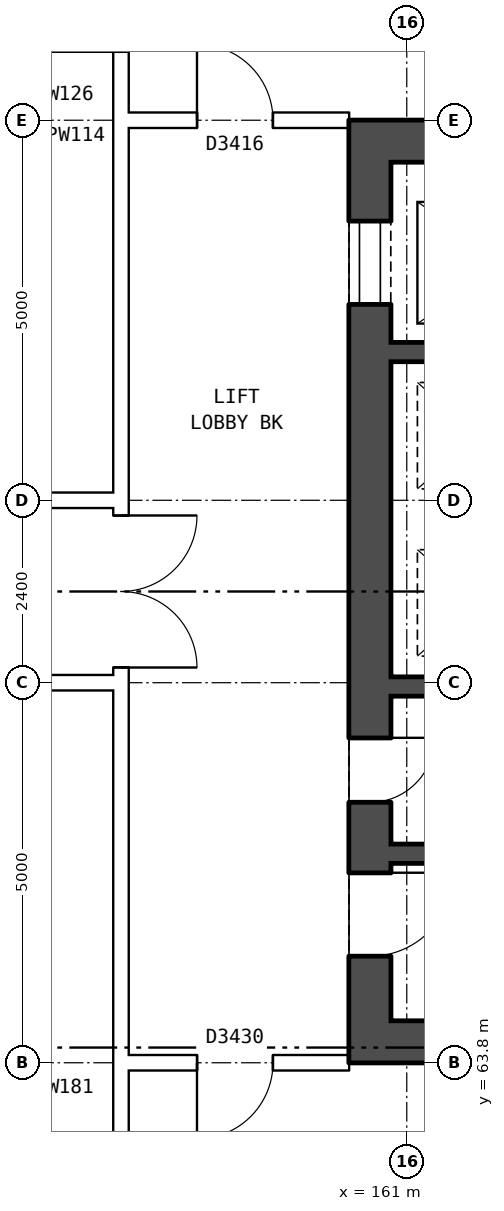
"""IFC4 building model, lengths in metres.
Left out: names, types, materials, properties, quantities, classifications, styles, units other than length and angle.
Written with IfcOpenShell. Run it as: python <this file> out.ifc"""

import sys

from ifc_helpers import new_model, si_unit, direction, frame, frame_2d, origin, place, context, subcontext, project, spatial, rectangle, extrude, element, fill, save


model = new_model("IFC4")
c1 = context("Model", 3, precision=1e-05, world=origin(), true_north=direction((0.0, 1.0)))
c2 = subcontext(c1, "Body", "Model", "MODEL_VIEW")
j1 = project(units=[si_unit("LENGTHUNIT", "METRE"), si_unit("PLANEANGLEUNIT", "RADIAN")], contexts=[c1])
p1 = place(None, origin())
s1 = spatial("IfcSite", under=j1, at=p1, CompositionType="ELEMENT")
p2 = place(p1, origin())
s2 = spatial("IfcBuilding", under=s1, at=p2, CompositionType="ELEMENT")
p3 = place(p2, frame((0.0, 0.0, 115.0)))
s3 = spatial("IfcBuildingStorey", under=s2, at=p3, CompositionType="ELEMENT", Elevation=115.0)
p4 = place(p3, frame((160.515, 76.2, 0.0), z_axis=(0.0, 0.0, 1.0), x_axis=(0.0, -1.0, 0.0)))
e1 = element("IfcWall", 1, at=p4, inside=s3, PredefinedType="SHEAR", context=c2, shape_type="SweptSolid", body=[
    extrude(rectangle(XDim=12.4, YDim=0.55, at=frame_2d((6.2, 0.0))), origin(), (0.0, 0.0, 1.0), 4.2),
])
p5 = place(p4, frame((1.325, 0.0, 0.0)))
e2 = element("IfcOpeningElement", 2, at=p5, cuts=e1, PredefinedType="OPENING", context=c2, shape_type="SweptSolid", body=[
    extrude(rectangle(XDim=1.1, YDim=2.1, at=frame_2d((0.55, 1.05))), frame((0.0, 0.285, 0.0), z_axis=(0.0, -1.0, 0.0), x_axis=(1.0, 0.0, 0.0)), (0.0, 0.0, 1.0), 0.57),
])
p6 = place(p4, frame((9.9, 0.0, 0.0)))
e3 = element("IfcOpeningElement", 3, at=p6, cuts=e1, PredefinedType="OPENING", context=c2, shape_type="SweptSolid", body=[
    extrude(rectangle(XDim=1.1, YDim=2.1, at=frame_2d((0.55, 1.05))), frame((0.0, 0.285, 0.0), z_axis=(0.0, -1.0, 0.0), x_axis=(1.0, 0.0, 0.0)), (0.0, 0.0, 1.0), 0.57),
])
p7 = place(p4, frame((8.125, 0.0, 0.0)))
e4 = element("IfcOpeningElement", 4, at=p7, cuts=e1, PredefinedType="OPENING", context=c2, shape_type="SweptSolid", body=[
    extrude(rectangle(XDim=0.85, YDim=2.1, at=frame_2d((0.425, 1.05))), frame((0.0, 0.285, 0.0), z_axis=(0.0, -1.0, 0.0), x_axis=(1.0, 0.0, 0.0)), (0.0, 0.0, 1.0), 0.57),
])
for number, where, z_axis, x_axis in (
    (5, (160.79, 75.925, 0.0), (0.0, 0.0, 1.0), (1.0, 0.0, 0.0)),
    (6, (160.79, 64.075, 0.0), (0.0, 0.0, 1.0), (1.0, 0.0, 0.0)),
):
    element("IfcWall", number, at=place(p3, frame(where, z_axis=z_axis, x_axis=x_axis)), inside=s3, PredefinedType="SHEAR", context=c2, shape_type="SweptSolid", body=[
        extrude(rectangle(XDim=7.3, YDim=0.55, at=frame_2d((3.65, 0.0))), origin(), (0.0, 0.0, 1.0), 4.2),
    ])
p8 = place(p3, frame((160.79, 73.15, 0.0), z_axis=(0.0, 0.0, 1.0), x_axis=(1.0, 0.0, 0.0)))
e7 = element("IfcWall", 7, at=p8, inside=s3, PredefinedType="SHEAR", context=c2, shape_type="SweptSolid", body=[
    extrude(rectangle(XDim=4.475, YDim=0.25, at=frame_2d((2.237, 0.0))), origin(), (0.0, 0.0, 1.0), 4.2),
])
p9 = place(p3, frame((160.79, 68.75, 0.0), z_axis=(0.0, 0.0, 1.0), x_axis=(1.0, 0.0, 0.0)))
e8 = element("IfcWall", 8, at=p9, inside=s3, PredefinedType="SHEAR", context=c2, shape_type="SweptSolid", body=[
    extrude(rectangle(XDim=7.3, YDim=0.25, at=frame_2d((3.65, 0.0))), origin(), (0.0, 0.0, 1.0), 4.2),
])
p10 = place(p9, frame((4.875, 0.0, 0.0)))
e9 = element("IfcOpeningElement", 9, at=p10, cuts=e8, PredefinedType="OPENING", context=c2, shape_type="SweptSolid", body=[
    extrude(rectangle(XDim=1.1, YDim=2.1, at=frame_2d((0.55, 1.05))), frame((0.0, 0.135, 0.0), z_axis=(0.0, -1.0, 0.0), x_axis=(1.0, 0.0, 0.0)), (0.0, 0.0, 1.0), 0.27),
])
p11 = place(p9, frame((3.125, 0.0, 0.0)))
e10 = element("IfcOpeningElement", 10, at=p11, cuts=e8, PredefinedType="OPENING", context=c2, shape_type="SweptSolid", body=[
    extrude(rectangle(XDim=0.85, YDim=2.1, at=frame_2d((0.425, 1.05))), frame((0.0, 0.135, 0.0), z_axis=(0.0, -1.0, 0.0), x_axis=(1.0, 0.0, 0.0)), (0.0, 0.0, 1.0), 0.27),
])
p12 = place(p3, frame((160.79, 66.55, 0.0), z_axis=(0.0, 0.0, 1.0), x_axis=(1.0, 0.0, 0.0)))
e11 = element("IfcWall", 11, at=p12, inside=s3, PredefinedType="SHEAR", context=c2, shape_type="SweptSolid", body=[
    extrude(rectangle(XDim=2.375, YDim=0.25, at=frame_2d((1.188, 0.0))), origin(), (0.0, 0.0, 1.0), 4.2),
])
p13 = place(p3, frame((157.24, 63.9, 0.0), z_axis=(0.0, 0.0, 1.0), x_axis=(0.0, 1.0, 0.0)))
e12 = element("IfcWall", 12, at=p13, inside=s3, PredefinedType="PARTITIONING", context=c2, shape_type="SweptSolid", body=[
    extrude(rectangle(XDim=12.2, YDim=0.2, at=frame_2d((6.1, 0.0))), origin(), (0.0, 0.0, 1.0), 4.2),
])
p14 = place(p13, frame((5.1, 0.0, 0.0)))
e13 = element("IfcOpeningElement", 13, at=p14, cuts=e12, PredefinedType="OPENING", context=c2, shape_type="SweptSolid", body=[
    extrude(rectangle(XDim=2.0, YDim=2.1, at=frame_2d((1.0, 1.05))), frame((0.0, 0.11, 0.0), z_axis=(0.0, -1.0, 0.0), x_axis=(1.0, 0.0, 0.0)), (0.0, 0.0, 1.0), 0.22),
])
p15 = place(p3, frame((157.14, 63.8, 0.0), z_axis=(0.0, 0.0, 1.0), x_axis=(1.0, 0.0, 0.0)))
e14 = element("IfcWall", 14, at=p15, inside=s3, PredefinedType="PARTITIONING", context=c2, shape_type="SweptSolid", body=[
    extrude(rectangle(XDim=3.1, YDim=0.2, at=frame_2d((1.55, 0.0))), origin(), (0.0, 0.0, 1.0), 4.2),
])
p16 = place(p15, frame((1.1, 0.0, 0.0)))
e15 = element("IfcOpeningElement", 15, at=p16, cuts=e14, PredefinedType="OPENING", context=c2, shape_type="SweptSolid", body=[
    extrude(rectangle(XDim=1.0, YDim=2.1, at=frame_2d((0.5, 1.05))), frame((0.0, 0.11, 0.0), z_axis=(0.0, -1.0, 0.0), x_axis=(1.0, 0.0, 0.0)), (0.0, 0.0, 1.0), 0.22),
])
for number, where, z_axis, x_axis in (
    (16, (142.76, 68.8, 0.0), (0.0, 0.0, 1.0), (1.0, 0.0, 0.0)),
    (17, (142.76, 71.2, 0.0), (0.0, 0.0, 1.0), (1.0, 0.0, 0.0)),
):
    element("IfcWall", number, at=place(p3, frame(where, z_axis=z_axis, x_axis=x_axis)), inside=s3, PredefinedType="PARTITIONING", context=c2, shape_type="SweptSolid", body=[
        extrude(rectangle(XDim=14.48, YDim=0.2, at=frame_2d((7.24, 0.0))), origin(), (0.0, 0.0, 1.0), 4.2),
    ])
p17 = place(p3, frame((157.14, 76.2, 0.0), z_axis=(0.0, 0.0, 1.0), x_axis=(1.0, 0.0, 0.0)))
e18 = element("IfcWall", 18, at=p17, inside=s3, PredefinedType="PARTITIONING", context=c2, shape_type="SweptSolid", body=[
    extrude(rectangle(XDim=3.1, YDim=0.2, at=frame_2d((1.55, 0.0))), origin(), (0.0, 0.0, 1.0), 4.2),
])
p18 = place(p17, frame((1.1, 0.0, 0.0)))
e19 = element("IfcOpeningElement", 19, at=p18, cuts=e18, PredefinedType="OPENING", context=c2, shape_type="SweptSolid", body=[
    extrude(rectangle(XDim=1.0, YDim=2.1, at=frame_2d((0.5, 1.05))), frame((0.0, 0.11, 0.0), z_axis=(0.0, -1.0, 0.0), x_axis=(1.0, 0.0, 0.0)), (0.0, 0.0, 1.0), 0.22),
])
p19 = place(p3, frame((157.24, 60.7, 0.0), z_axis=(0.0, 0.0, 1.0), x_axis=(0.0, 1.0, 0.0)))
e20 = element("IfcWall", 20, at=p19, inside=s3, PredefinedType="PARTITIONING", context=c2, shape_type="SweptSolid", body=[
    extrude(rectangle(XDim=3.2, YDim=0.2, at=frame_2d((1.6, 0.0))), origin(), (0.0, 0.0, 1.0), 4.2),
])
p20 = place(p19, frame((1.1, 0.0, 0.0)))
e21 = element("IfcOpeningElement", 21, at=p20, cuts=e20, PredefinedType="OPENING", context=c2, shape_type="SweptSolid", body=[
    extrude(rectangle(XDim=1.0, YDim=2.1, at=frame_2d((0.5, 1.05))), frame((0.0, 0.11, 0.0), z_axis=(0.0, -1.0, 0.0), x_axis=(1.0, 0.0, 0.0)), (0.0, 0.0, 1.0), 0.22),
])
p21 = place(p3, frame((157.24, 76.1, 0.0), z_axis=(0.0, 0.0, 1.0), x_axis=(0.0, 1.0, 0.0)))
e22 = element("IfcWall", 22, at=p21, inside=s3, PredefinedType="PARTITIONING", context=c2, shape_type="SweptSolid", body=[
    extrude(rectangle(XDim=3.0, YDim=0.2, at=frame_2d((1.5, 0.0))), origin(), (0.0, 0.0, 1.0), 4.2),
])
p22 = place(p21, frame((1.0, 0.0, 0.0)))
e23 = element("IfcOpeningElement", 23, at=p22, cuts=e22, PredefinedType="OPENING", context=c2, shape_type="SweptSolid", body=[
    extrude(rectangle(XDim=1.0, YDim=2.1, at=frame_2d((0.5, 1.05))), frame((0.0, 0.11, 0.0), z_axis=(0.0, -1.0, 0.0), x_axis=(1.0, 0.0, 0.0)), (0.0, 0.0, 1.0), 0.22),
])
p23 = place(p5, origin())
e24 = element("IfcDoor", 24, at=p23, inside=s3, OperationType="DOUBLE_DOOR_SLIDING", PredefinedType="DOOR", context=c2, shape_type="SweptSolid", body=[
    extrude(rectangle(XDim=1.1, YDim=2.1, at=frame_2d((0.55, 1.05))), frame((0.0, 0.26, 0.0), z_axis=(0.0, -1.0, 0.0), x_axis=(1.0, 0.0, 0.0)), (0.0, 0.0, 1.0), 0.05),
])
fill(e2, e24)
p24 = place(p6, origin())
e25 = element("IfcDoor", 25, at=p24, inside=s3, OperationType="SINGLE_SWING_LEFT", PredefinedType="DOOR", context=c2, shape_type="SweptSolid", body=[
    extrude(rectangle(XDim=1.1, YDim=2.1, at=frame_2d((0.55, 1.05))), frame((0.0, 0.26, 0.0), z_axis=(0.0, -1.0, 0.0), x_axis=(1.0, 0.0, 0.0)), (0.0, 0.0, 1.0), 0.05),
])
fill(e3, e25)
p25 = place(p7, origin())
e26 = element("IfcDoor", 26, at=p25, inside=s3, OperationType="SINGLE_SWING_LEFT", PredefinedType="DOOR", context=c2, shape_type="SweptSolid", body=[
    extrude(rectangle(XDim=0.85, YDim=2.1, at=frame_2d((0.425, 1.05))), frame((0.0, 0.26, 0.0), z_axis=(0.0, -1.0, 0.0), x_axis=(1.0, 0.0, 0.0)), (0.0, 0.0, 1.0), 0.05),
])
fill(e4, e26)
p26 = place(p14, frame((2.0, 0.0, 0.0), z_axis=(0.0, 0.0, 1.0), x_axis=(-1.0, 0.0, 0.0)))
e27 = element("IfcDoor", 27, at=p26, inside=s3, OperationType="DOUBLE_DOOR_SINGLE_SWING", PredefinedType="DOOR", context=c2, shape_type="SweptSolid", body=[
    extrude(rectangle(XDim=2.0, YDim=2.1, at=frame_2d((1.0, 1.05))), frame((0.0, 0.025, 0.0), z_axis=(0.0, -1.0, 0.0), x_axis=(1.0, 0.0, 0.0)), (0.0, 0.0, 1.0), 0.05),
])
fill(e13, e27)
p27 = place(p16, frame((1.0, 0.0, 0.0), z_axis=(0.0, 0.0, 1.0), x_axis=(-1.0, 0.0, 0.0)))
e28 = element("IfcDoor", 28, at=p27, inside=s3, OperationType="SINGLE_SWING_RIGHT", PredefinedType="DOOR", context=c2, shape_type="SweptSolid", body=[
    extrude(rectangle(XDim=1.0, YDim=2.1, at=frame_2d((0.5, 1.05))), frame((0.0, 0.025, 0.0), z_axis=(0.0, -1.0, 0.0), x_axis=(1.0, 0.0, 0.0)), (0.0, 0.0, 1.0), 0.05),
])
fill(e15, e28)
p28 = place(p18, origin())
e29 = element("IfcDoor", 29, at=p28, inside=s3, OperationType="SINGLE_SWING_LEFT", PredefinedType="DOOR", context=c2, shape_type="SweptSolid", body=[
    extrude(rectangle(XDim=1.0, YDim=2.1, at=frame_2d((0.5, 1.05))), frame((0.0, 0.025, 0.0), z_axis=(0.0, -1.0, 0.0), x_axis=(1.0, 0.0, 0.0)), (0.0, 0.0, 1.0), 0.05),
])
fill(e19, e29)
save(model, sys.argv[1])
